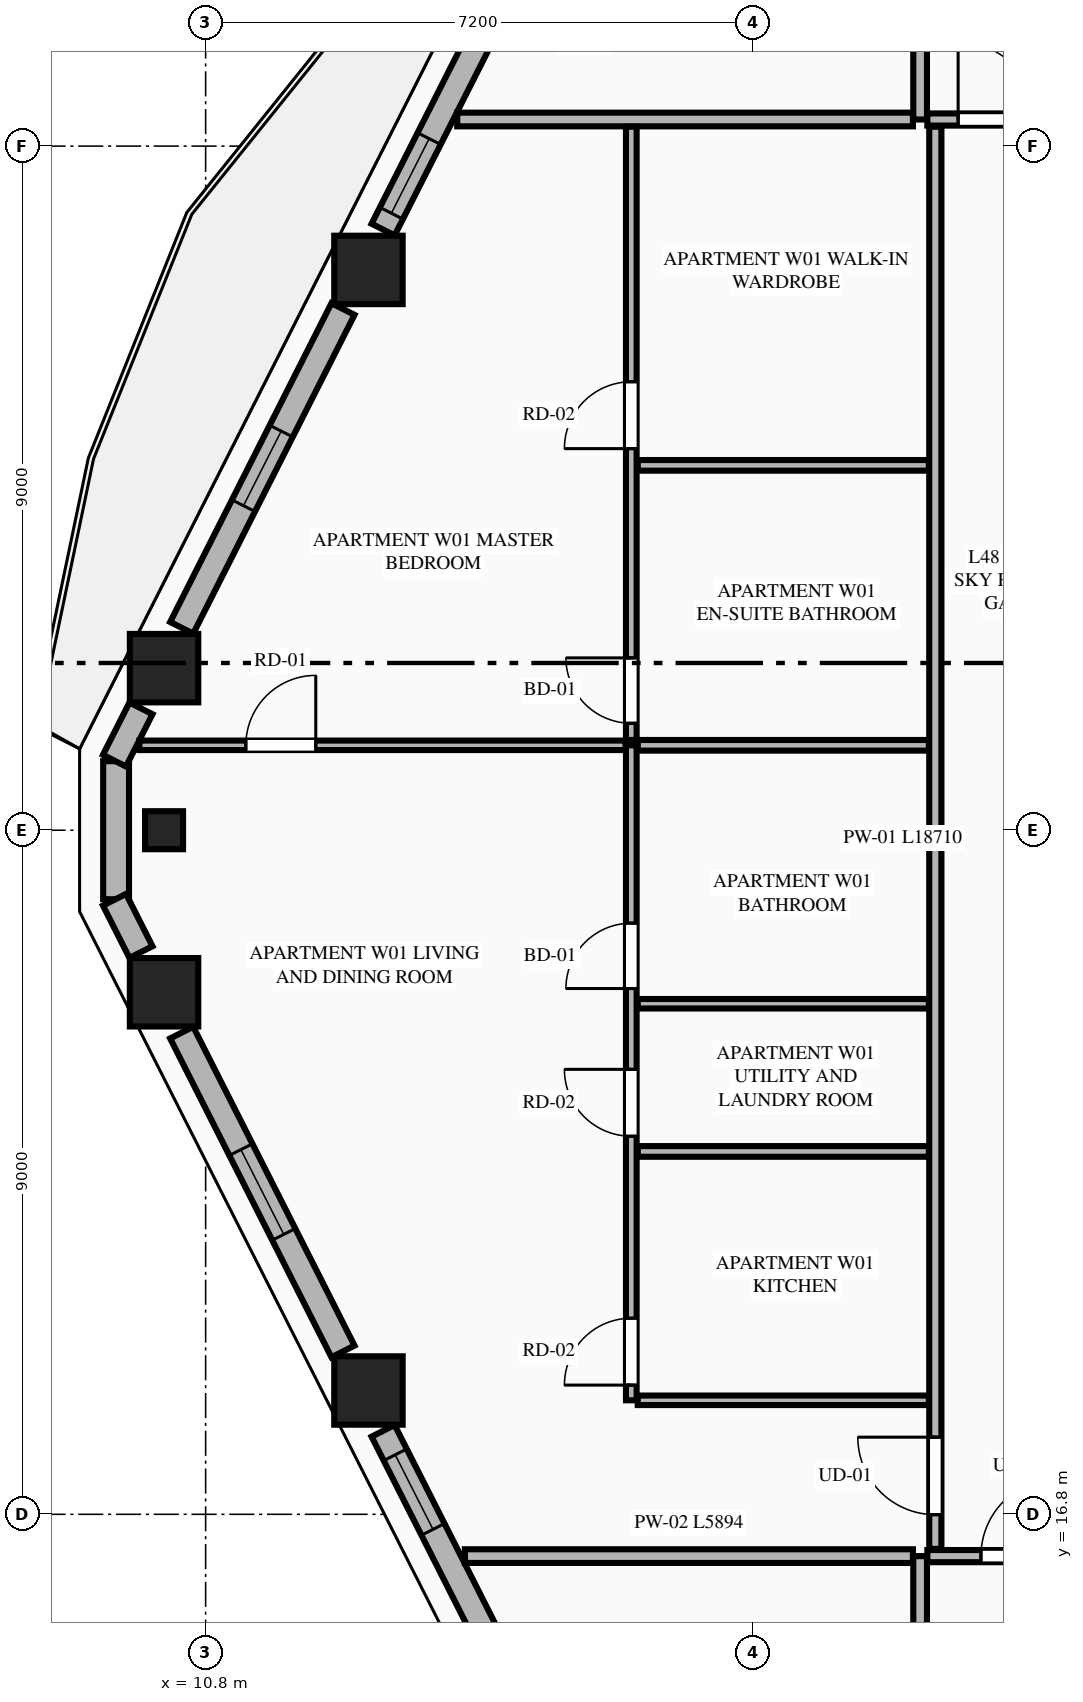
"""IFC4 building model, lengths in metres.
Left out: names, types, materials, properties, quantities, classifications, styles, units other than length and angle.
Written with IfcOpenShell. Run it as: python <this file> out.ifc"""

import sys

from ifc_helpers import new_model, si_unit, direction, frame, frame_2d, origin, origin_2d, place, context, subcontext, project, spatial, rectangle, extrude, element, fill, save


model = new_model("IFC4")
c1 = context("Model", 3, precision=1e-05, world=origin(), true_north=direction((0.0, 1.0)))
c2 = subcontext(c1, "Body", "Model", "MODEL_VIEW")
j1 = project(units=[si_unit("LENGTHUNIT", "METRE"), si_unit("PLANEANGLEUNIT", "RADIAN")], contexts=[c1])
p1 = place(None, origin())
s1 = spatial("IfcSite", under=j1, at=p1, CompositionType="ELEMENT")
p2 = place(p1, origin())
s2 = spatial("IfcBuilding", under=s1, at=p2, CompositionType="ELEMENT")
p3 = place(p2, frame((0.0, 0.0, 182.55)))
s3 = spatial("IfcBuildingStorey", under=s2, at=p3, CompositionType="ELEMENT", Elevation=182.55)
for number, where, z_axis, x_axis in (
    (1, (12.942, 33.171, 0.0), (0.0, 0.0, 1.0), (1.0, 0.0, 0.0)),
    (2, (10.253, 27.932, 0.0), (0.0, 0.0, 1.0), (1.0, 0.0, 0.0)),
    (3, (10.253, 23.668, 0.0), (0.0, 0.0, 1.0), (1.0, 0.0, 0.0)),
    (4, (12.942, 18.429, 0.0), (0.0, 0.0, 1.0), (1.0, 0.0, 0.0)),
):
    element("IfcColumn", number, at=place(p3, frame(where, z_axis=z_axis, x_axis=x_axis)), inside=s3, PredefinedType="COLUMN", context=c2, shape_type="SweptSolid", body=[
        extrude(rectangle(XDim=0.9, YDim=0.9, at=origin_2d()), origin(), (0.0, 0.0, 1.0), 3.55),
    ])
p4 = place(p3, frame((10.253, 25.8, 0.0), z_axis=(0.0, 0.0, 1.0), x_axis=(0.0, -1.0, 0.0)))
e5 = element("IfcColumn", 5, at=p4, inside=s3, PredefinedType="PILASTER", context=c2, shape_type="SweptSolid", body=[
    extrude(rectangle(XDim=0.5, YDim=0.35, at=origin_2d()), origin(), (0.0, 0.0, 1.0), 3.55),
])
p5 = place(p3, frame((9.622, 26.708, 0.0), z_axis=(0.0, 0.0, 1.0), x_axis=(0.0, -1.0, 0.0)))
e6 = element("IfcWall", 6, at=p5, inside=s3, PredefinedType="STANDARD", context=c2, shape_type="SweptSolid", body=[
    extrude(rectangle(XDim=1.816, YDim=0.34, at=frame_2d((0.908, 0.0))), origin(), (0.0, 0.0, 1.0), 3.35),
])
p6 = place(p3, frame((15.352, 38.083, 0.0), z_axis=(0.0, 0.0, 1.0), x_axis=(-0.451524246964, -0.89225884944, 0.0)))
e7 = element("IfcWall", 7, at=p6, inside=s3, PredefinedType="STANDARD", context=c2, shape_type="SweptSolid", body=[
    extrude(rectangle(XDim=4.91, YDim=0.34, at=frame_2d((2.455, 0.0))), origin(), (0.0, 0.0, 1.0), 2.883),
])
p7 = place(p6, frame((0.968, 0.0, 0.0)))
e8 = element("IfcOpeningElement", 8, at=p7, cuts=e7, PredefinedType="OPENING", context=c2, shape_type="SweptSolid", body=[
    extrude(rectangle(XDim=1.1, YDim=2.25, at=frame_2d((0.55, 1.125))), frame((0.0, 0.18, 0.0), z_axis=(0.0, -1.0, 0.0), x_axis=(1.0, 0.0, 0.0)), (0.0, 0.0, 1.0), 0.36),
])
p8 = place(p6, frame((3.569, 0.0, 0.75)))
e9 = element("IfcOpeningElement", 9, at=p8, cuts=e7, PredefinedType="OPENING", context=c2, shape_type="SweptSolid", body=[
    extrude(rectangle(XDim=1.1, YDim=1.983, at=frame_2d((0.55, 0.991))), frame((0.0, 0.18, 0.0), z_axis=(0.0, -1.0, 0.0), x_axis=(1.0, 0.0, 0.0)), (0.0, 0.0, 1.0), 0.36),
])
p9 = place(p3, frame((12.607, 32.657, 0.0), z_axis=(0.0, 0.0, 1.0), x_axis=(-0.451426298588, -0.892308409096, 0.0)))
e10 = element("IfcWall", 10, at=p9, inside=s3, PredefinedType="STANDARD", context=c2, shape_type="SweptSolid", body=[
    extrude(rectangle(XDim=4.7, YDim=0.34, at=frame_2d((2.35, 0.0))), origin(), (0.0, 0.0, 1.0), 2.883),
])
p10 = place(p9, frame((1.8, 0.0, 0.75)))
e11 = element("IfcOpeningElement", 11, at=p10, cuts=e10, PredefinedType="OPENING", context=c2, shape_type="SweptSolid", body=[
    extrude(rectangle(XDim=1.1, YDim=1.983, at=frame_2d((0.55, 0.991))), frame((0.0, 0.18, 0.0), z_axis=(0.0, -1.0, 0.0), x_axis=(1.0, 0.0, 0.0)), (0.0, 0.0, 1.0), 0.36),
])
for number, where, z_axis, x_axis in (
    (12, (9.949, 27.403, 0.0), (0.0, 0.0, 1.0), (-0.451, -0.892, 0.0)),
    (13, (9.601, 24.885, 0.0), (0.0, 0.0, 1.0), (0.451, -0.892, 0.0)),
):
    element("IfcWall", number, at=place(p3, frame(where, z_axis=z_axis, x_axis=x_axis)), inside=s3, PredefinedType="STANDARD", context=c2, shape_type="SweptSolid", body=[
        extrude(rectangle(XDim=0.771, YDim=0.34, at=frame_2d((0.385, 0.0))), origin(), (0.0, 0.0, 1.0), 3.35),
    ])
p11 = place(p3, frame((10.485, 23.137, 0.0), z_axis=(0.0, 0.0, 1.0), x_axis=(0.451447222193, -0.892297823361, 0.0)))
e14 = element("IfcWall", 14, at=p11, inside=s3, PredefinedType="STANDARD", context=c2, shape_type="SweptSolid", body=[
    extrude(rectangle(XDim=4.7, YDim=0.34, at=frame_2d((2.35, 0.0))), origin(), (0.0, 0.0, 1.0), 2.883),
])
p12 = place(p11, frame((1.725, 0.0, 0.75)))
e15 = element("IfcOpeningElement", 15, at=p12, cuts=e14, PredefinedType="OPENING", context=c2, shape_type="SweptSolid", body=[
    extrude(rectangle(XDim=1.25, YDim=1.95, at=frame_2d((0.625, 0.975))), frame((0.0, 0.18, 0.0), z_axis=(0.0, -1.0, 0.0), x_axis=(1.0, 0.0, 0.0)), (0.0, 0.0, 1.0), 0.36),
])
p13 = place(p3, frame((13.135, 17.898, 0.0), z_axis=(0.0, 0.0, 1.0), x_axis=(0.451544279509, -0.892248711763, 0.0)))
e16 = element("IfcWall", 16, at=p13, inside=s3, PredefinedType="STANDARD", context=c2, shape_type="SweptSolid", body=[
    extrude(rectangle(XDim=4.91, YDim=0.34, at=frame_2d((2.455, 0.0))), origin(), (0.0, 0.0, 1.0), 2.883),
])
p14 = place(p13, frame((0.353, 0.0, 0.75)))
e17 = element("IfcOpeningElement", 17, at=p14, cuts=e16, PredefinedType="OPENING", context=c2, shape_type="SweptSolid", body=[
    extrude(rectangle(XDim=1.1, YDim=1.983, at=frame_2d((0.55, 0.991))), frame((0.0, 0.18, 0.0), z_axis=(0.0, -1.0, 0.0), x_axis=(1.0, 0.0, 0.0)), (0.0, 0.0, 1.0), 0.36),
])
p15 = place(p13, frame((2.959, 0.0, 0.75)))
e18 = element("IfcOpeningElement", 18, at=p15, cuts=e16, PredefinedType="OPENING", context=c2, shape_type="SweptSolid", body=[
    extrude(rectangle(XDim=1.1, YDim=1.983, at=frame_2d((0.55, 0.991))), frame((0.0, 0.18, 0.0), z_axis=(0.0, -1.0, 0.0), x_axis=(1.0, 0.0, 0.0)), (0.0, 0.0, 1.0), 0.36),
])
p16 = place(p3, frame((20.2, 5.968, 0.0), z_axis=(0.0, 0.0, 1.0), x_axis=(0.0, 1.0, 0.0)))
e19 = element("IfcWall", 19, at=p16, inside=s3, PredefinedType="PARTITIONING", context=c2, shape_type="SweptSolid", body=[
    extrude(rectangle(XDim=10.282, YDim=0.18, at=frame_2d((5.141, 0.0))), origin(), (0.0, 0.0, 1.0), 3.35),
])
p17 = place(p3, frame((20.295, 16.25, 0.0), z_axis=(0.0, 0.0, 1.0), x_axis=(1.0, 0.0, 0.0)))
e20 = element("IfcWall", 20, at=p17, inside=s3, PredefinedType="PARTITIONING", context=c2, shape_type="SweptSolid", body=[
    extrude(rectangle(XDim=8.467, YDim=0.16, at=frame_2d((4.233, 0.0))), origin(), (0.0, 0.0, 1.0), 3.35),
])
p18 = place(p17, frame((0.705, 0.0, 0.0)))
e21 = element("IfcOpeningElement", 21, at=p18, cuts=e20, PredefinedType="OPENING", context=c2, shape_type="SweptSolid", body=[
    extrude(rectangle(XDim=1.02, YDim=2.25, at=frame_2d((0.51, 1.125))), frame((0.0, 0.09, 0.0), z_axis=(0.0, -1.0, 0.0), x_axis=(1.0, 0.0, 0.0)), (0.0, 0.0, 1.0), 0.18),
])
p19 = place(p3, frame((20.2, 35.15, 0.0), z_axis=(0.0, 0.0, 1.0), x_axis=(0.0, 1.0, 0.0)))
e22 = element("IfcWall", 22, at=p19, inside=s3, PredefinedType="PARTITIONING", context=c2, shape_type="SweptSolid", body=[
    extrude(rectangle(XDim=10.482, YDim=0.18, at=frame_2d((5.241, 0.0))), origin(), (0.0, 0.0, 1.0), 3.35),
])
p20 = place(p3, frame((20.295, 35.15, 0.0), z_axis=(0.0, 0.0, 1.0), x_axis=(1.0, 0.0, 0.0)))
e23 = element("IfcWall", 23, at=p20, inside=s3, PredefinedType="PARTITIONING", context=c2, shape_type="SweptSolid", body=[
    extrude(rectangle(XDim=15.553, YDim=0.16, at=frame_2d((7.776, 0.0))), origin(), (0.0, 0.0, 1.0), 3.35),
])
p21 = place(p20, frame((0.405, 0.0, 0.0)))
e24 = element("IfcOpeningElement", 24, at=p21, cuts=e23, PredefinedType="OPENING", context=c2, shape_type="SweptSolid", body=[
    extrude(rectangle(XDim=1.02, YDim=2.25, at=frame_2d((0.51, 1.125))), frame((0.0, 0.09, 0.0), z_axis=(0.0, -1.0, 0.0), x_axis=(1.0, 0.0, 0.0)), (0.0, 0.0, 1.0), 0.18),
])
p22 = place(p3, frame((14.211, 16.25, 0.0), z_axis=(0.0, 0.0, 1.0), x_axis=(1.0, 0.0, 0.0)))
e25 = element("IfcWall", 25, at=p22, inside=s3, PredefinedType="PARTITIONING", context=c2, shape_type="SweptSolid", body=[
    extrude(rectangle(XDim=5.894, YDim=0.18, at=frame_2d((2.947, 0.0))), origin(), (0.0, 0.0, 1.0), 3.35),
])
p23 = place(p3, frame((14.11, 35.15, 0.0), z_axis=(0.0, 0.0, 1.0), x_axis=(1.0, 0.0, 0.0)))
e26 = element("IfcWall", 26, at=p23, inside=s3, PredefinedType="PARTITIONING", context=c2, shape_type="SweptSolid", body=[
    extrude(rectangle(XDim=5.995, YDim=0.18, at=frame_2d((2.998, 0.0))), origin(), (0.0, 0.0, 1.0), 3.35),
])
p24 = place(p3, frame((20.4, 16.345, 0.0), z_axis=(0.0, 0.0, 1.0), x_axis=(0.0, 1.0, 0.0)))
e27 = element("IfcWall", 27, at=p24, inside=s3, PredefinedType="PARTITIONING", context=c2, shape_type="SweptSolid", body=[
    extrude(rectangle(XDim=18.71, YDim=0.16, at=frame_2d((9.355, 0.0))), origin(), (0.0, 0.0, 1.0), 3.35),
])
p25 = place(p24, frame((0.45, 0.0, 0.0)))
e28 = element("IfcOpeningElement", 28, at=p25, cuts=e27, PredefinedType="OPENING", context=c2, shape_type="SweptSolid", body=[
    extrude(rectangle(XDim=1.02, YDim=2.25, at=frame_2d((0.51, 1.125))), frame((0.0, 0.09, 0.0), z_axis=(0.0, -1.0, 0.0), x_axis=(1.0, 0.0, 0.0)), (0.0, 0.0, 1.0), 0.18),
])
p26 = place(p3, frame((16.485, 18.3, 0.0), z_axis=(0.0, 0.0, 1.0), x_axis=(1.0, 0.0, 0.0)))
e29 = element("IfcWall", 29, at=p26, inside=s3, PredefinedType="PARTITIONING", context=c2, shape_type="SweptSolid", body=[
    extrude(rectangle(XDim=3.83, YDim=0.125, at=frame_2d((1.915, 0.0))), origin(), (0.0, 0.0, 1.0), 2.807),
])
p27 = place(p3, frame((16.4, 18.3, 0.0), z_axis=(0.0, 0.0, 1.0), x_axis=(0.0, 1.0, 0.0)))
e30 = element("IfcWall", 30, at=p27, inside=s3, PredefinedType="PLUMBINGWALL", context=c2, shape_type="SweptSolid", body=[
    extrude(rectangle(XDim=8.617, YDim=0.14, at=frame_2d((4.309, 0.0))), origin(), (0.0, 0.0, 1.0), 3.35),
])
p28 = place(p27, frame((0.2, 0.0, 0.0)))
e31 = element("IfcOpeningElement", 31, at=p28, cuts=e30, PredefinedType="OPENING", context=c2, shape_type="SweptSolid", body=[
    extrude(rectangle(XDim=0.88, YDim=2.15, at=frame_2d((0.44, 1.075))), frame((0.0, 0.08, 0.0), z_axis=(0.0, -1.0, 0.0), x_axis=(1.0, 0.0, 0.0)), (0.0, 0.0, 1.0), 0.16),
])
p29 = place(p27, frame((3.474, 0.0, 0.0)))
e32 = element("IfcOpeningElement", 32, at=p29, cuts=e30, PredefinedType="OPENING", context=c2, shape_type="SweptSolid", body=[
    extrude(rectangle(XDim=0.88, YDim=2.15, at=frame_2d((0.44, 1.075))), frame((0.0, 0.08, 0.0), z_axis=(0.0, -1.0, 0.0), x_axis=(1.0, 0.0, 0.0)), (0.0, 0.0, 1.0), 0.16),
])
p30 = place(p27, frame((5.417, 0.0, 0.0)))
e33 = element("IfcOpeningElement", 33, at=p30, cuts=e30, PredefinedType="OPENING", context=c2, shape_type="SweptSolid", body=[
    extrude(rectangle(XDim=0.86, YDim=2.1, at=frame_2d((0.43, 1.05))), frame((0.0, 0.08, 0.0), z_axis=(0.0, -1.0, 0.0), x_axis=(1.0, 0.0, 0.0)), (0.0, 0.0, 1.0), 0.16),
])
p31 = place(p3, frame((16.4, 26.987, 0.0), z_axis=(0.0, 0.0, 1.0), x_axis=(0.0, 1.0, 0.0)))
e34 = element("IfcWall", 34, at=p31, inside=s3, PredefinedType="PLUMBINGWALL", context=c2, shape_type="SweptSolid", body=[
    extrude(rectangle(XDim=8.068, YDim=0.14, at=frame_2d((4.034, 0.0))), origin(), (0.0, 0.0, 1.0), 3.35),
])
p32 = place(p31, frame((0.22, 0.0, 0.0)))
e35 = element("IfcOpeningElement", 35, at=p32, cuts=e34, PredefinedType="OPENING", context=c2, shape_type="SweptSolid", body=[
    extrude(rectangle(XDim=0.86, YDim=2.1, at=frame_2d((0.43, 1.05))), frame((0.0, 0.08, 0.0), z_axis=(0.0, -1.0, 0.0), x_axis=(1.0, 0.0, 0.0)), (0.0, 0.0, 1.0), 0.16),
])
p33 = place(p31, frame((3.833, 0.0, 0.0)))
e36 = element("IfcOpeningElement", 36, at=p33, cuts=e34, PredefinedType="OPENING", context=c2, shape_type="SweptSolid", body=[
    extrude(rectangle(XDim=0.88, YDim=2.15, at=frame_2d((0.44, 1.075))), frame((0.0, 0.08, 0.0), z_axis=(0.0, -1.0, 0.0), x_axis=(1.0, 0.0, 0.0)), (0.0, 0.0, 1.0), 0.16),
])
p34 = place(p3, frame((16.485, 26.917, 0.0), z_axis=(0.0, 0.0, 1.0), x_axis=(1.0, 0.0, 0.0)))
e37 = element("IfcWall", 37, at=p34, inside=s3, PredefinedType="PLUMBINGWALL", context=c2, shape_type="SweptSolid", body=[
    extrude(rectangle(XDim=3.83, YDim=0.14, at=frame_2d((1.915, 0.0))), origin(), (0.0, 0.0, 1.0), 3.35),
])
p35 = place(p3, frame((9.929, 26.917, 0.0), z_axis=(0.0, 0.0, 1.0), x_axis=(1.0, 0.0, 0.0)))
e38 = element("IfcWall", 38, at=p35, inside=s3, PredefinedType="PARTITIONING", context=c2, shape_type="SweptSolid", body=[
    extrude(rectangle(XDim=6.396, YDim=0.125, at=frame_2d((3.198, 0.0))), origin(), (0.0, 0.0, 1.0), 3.35),
])
p36 = place(p35, frame((1.4, 0.0, 0.0)))
e39 = element("IfcOpeningElement", 39, at=p36, cuts=e38, PredefinedType="OPENING", context=c2, shape_type="SweptSolid", body=[
    extrude(rectangle(XDim=0.92, YDim=2.15, at=frame_2d((0.46, 1.075))), frame((0.0, 0.073, 0.0), z_axis=(0.0, -1.0, 0.0), x_axis=(1.0, 0.0, 0.0)), (0.0, 0.0, 1.0), 0.145),
])
p37 = place(p3, frame((16.485, 21.574, 0.0), z_axis=(0.0, 0.0, 1.0), x_axis=(1.0, 0.0, 0.0)))
e40 = element("IfcWall", 40, at=p37, inside=s3, PredefinedType="PLUMBINGWALL", context=c2, shape_type="SweptSolid", body=[
    extrude(rectangle(XDim=3.83, YDim=0.14, at=frame_2d((1.915, 0.0))), origin(), (0.0, 0.0, 1.0), 3.35),
])
p38 = place(p3, frame((16.485, 23.517, 0.0), z_axis=(0.0, 0.0, 1.0), x_axis=(1.0, 0.0, 0.0)))
e41 = element("IfcWall", 41, at=p38, inside=s3, PredefinedType="PARTITIONING", context=c2, shape_type="SweptSolid", body=[
    extrude(rectangle(XDim=3.83, YDim=0.125, at=frame_2d((1.915, 0.0))), origin(), (0.0, 0.0, 1.0), 3.35),
])
p39 = place(p3, frame((16.485, 30.6, 0.0), z_axis=(0.0, 0.0, 1.0), x_axis=(1.0, 0.0, 0.0)))
e42 = element("IfcWall", 42, at=p39, inside=s3, PredefinedType="PLUMBINGWALL", context=c2, shape_type="SweptSolid", body=[
    extrude(rectangle(XDim=3.83, YDim=0.14, at=frame_2d((1.915, 0.0))), origin(), (0.0, 0.0, 1.0), 3.35),
])
p40 = place(p10, origin())
e43 = element("IfcWindow", 43, at=p40, inside=s3, PartitioningType="SINGLE_PANEL", PredefinedType="WINDOW", context=c2, shape_type="SweptSolid", body=[
    extrude(rectangle(XDim=1.1, YDim=1.983, at=frame_2d((0.55, 0.991))), frame((0.0, 0.03, 0.0), z_axis=(0.0, -1.0, 0.0), x_axis=(1.0, 0.0, 0.0)), (0.0, 0.0, 1.0), 0.06),
])
fill(e11, e43)
p41 = place(p12, origin())
e44 = element("IfcWindow", 44, at=p41, inside=s3, PartitioningType="SINGLE_PANEL", PredefinedType="WINDOW", context=c2, shape_type="SweptSolid", body=[
    extrude(rectangle(XDim=1.25, YDim=1.95, at=frame_2d((0.625, 0.975))), frame((0.0, 0.03, 0.0), z_axis=(0.0, -1.0, 0.0), x_axis=(1.0, 0.0, 0.0)), (0.0, 0.0, 1.0), 0.06),
])
fill(e15, e44)
p42 = place(p14, origin())
e45 = element("IfcWindow", 45, at=p42, inside=s3, PartitioningType="SINGLE_PANEL", PredefinedType="WINDOW", context=c2, shape_type="SweptSolid", body=[
    extrude(rectangle(XDim=1.1, YDim=1.983, at=frame_2d((0.55, 0.991))), frame((0.0, 0.03, 0.0), z_axis=(0.0, -1.0, 0.0), x_axis=(1.0, 0.0, 0.0)), (0.0, 0.0, 1.0), 0.06),
])
fill(e17, e45)
p43 = place(p18, origin())
e46 = element("IfcDoor", 46, at=p43, inside=s3, OperationType="SINGLE_SWING_RIGHT", PredefinedType="DOOR", context=c2, shape_type="SweptSolid", body=[
    extrude(rectangle(XDim=1.02, YDim=2.25, at=frame_2d((0.51, 1.125))), frame((0.0, 0.025, 0.0), z_axis=(0.0, -1.0, 0.0), x_axis=(1.0, 0.0, 0.0)), (0.0, 0.0, 1.0), 0.05),
])
fill(e21, e46)
p44 = place(p21, origin())
e47 = element("IfcDoor", 47, at=p44, inside=s3, OperationType="SINGLE_SWING_LEFT", PredefinedType="DOOR", context=c2, shape_type="SweptSolid", body=[
    extrude(rectangle(XDim=1.02, YDim=2.25, at=frame_2d((0.51, 1.125))), frame((0.0, 0.025, 0.0), z_axis=(0.0, -1.0, 0.0), x_axis=(1.0, 0.0, 0.0)), (0.0, 0.0, 1.0), 0.05),
])
fill(e24, e47)
p45 = place(p28, origin())
e48 = element("IfcDoor", 48, at=p45, inside=s3, OperationType="SINGLE_SWING_LEFT", PredefinedType="DOOR", context=c2, shape_type="SweptSolid", body=[
    extrude(rectangle(XDim=0.88, YDim=2.15, at=frame_2d((0.44, 1.075))), frame((0.0, 0.025, 0.0), z_axis=(0.0, -1.0, 0.0), x_axis=(1.0, 0.0, 0.0)), (0.0, 0.0, 1.0), 0.05),
])
fill(e31, e48)
p46 = place(p29, origin())
e49 = element("IfcDoor", 49, at=p46, inside=s3, OperationType="SINGLE_SWING_RIGHT", PredefinedType="DOOR", context=c2, shape_type="SweptSolid", body=[
    extrude(rectangle(XDim=0.88, YDim=2.15, at=frame_2d((0.44, 1.075))), frame((0.0, 0.025, 0.0), z_axis=(0.0, -1.0, 0.0), x_axis=(1.0, 0.0, 0.0)), (0.0, 0.0, 1.0), 0.05),
])
fill(e32, e49)
p47 = place(p30, origin())
e50 = element("IfcDoor", 50, at=p47, inside=s3, OperationType="SINGLE_SWING_LEFT", PredefinedType="DOOR", context=c2, shape_type="SweptSolid", body=[
    extrude(rectangle(XDim=0.86, YDim=2.1, at=frame_2d((0.43, 1.05))), frame((0.0, 0.025, 0.0), z_axis=(0.0, -1.0, 0.0), x_axis=(1.0, 0.0, 0.0)), (0.0, 0.0, 1.0), 0.05),
])
fill(e33, e50)
p48 = place(p32, origin())
e51 = element("IfcDoor", 51, at=p48, inside=s3, OperationType="SINGLE_SWING_RIGHT", PredefinedType="DOOR", context=c2, shape_type="SweptSolid", body=[
    extrude(rectangle(XDim=0.86, YDim=2.1, at=frame_2d((0.43, 1.05))), frame((0.0, 0.025, 0.0), z_axis=(0.0, -1.0, 0.0), x_axis=(1.0, 0.0, 0.0)), (0.0, 0.0, 1.0), 0.05),
])
fill(e35, e51)
p49 = place(p33, origin())
e52 = element("IfcDoor", 52, at=p49, inside=s3, OperationType="SINGLE_SWING_LEFT", PredefinedType="DOOR", context=c2, shape_type="SweptSolid", body=[
    extrude(rectangle(XDim=0.88, YDim=2.15, at=frame_2d((0.44, 1.075))), frame((0.0, 0.025, 0.0), z_axis=(0.0, -1.0, 0.0), x_axis=(1.0, 0.0, 0.0)), (0.0, 0.0, 1.0), 0.05),
])
fill(e36, e52)
p50 = place(p25, origin())
e53 = element("IfcDoor", 53, at=p50, inside=s3, OperationType="SINGLE_SWING_RIGHT", PredefinedType="DOOR", context=c2, shape_type="SweptSolid", body=[
    extrude(rectangle(XDim=1.02, YDim=2.25, at=frame_2d((0.51, 1.125))), frame((0.0, 0.025, 0.0), z_axis=(0.0, -1.0, 0.0), x_axis=(1.0, 0.0, 0.0)), (0.0, 0.0, 1.0), 0.05),
])
fill(e28, e53)
p51 = place(p36, origin())
e54 = element("IfcDoor", 54, at=p51, inside=s3, OperationType="SINGLE_SWING_RIGHT", PredefinedType="DOOR", context=c2, shape_type="SweptSolid", body=[
    extrude(rectangle(XDim=0.92, YDim=2.15, at=frame_2d((0.46, 1.075))), frame((0.0, 0.025, 0.0), z_axis=(0.0, -1.0, 0.0), x_axis=(1.0, 0.0, 0.0)), (0.0, 0.0, 1.0), 0.05),
])
fill(e39, e54)
p52 = place(p8, origin())
e55 = element("IfcWindow", 55, at=p52, inside=s3, PartitioningType="SINGLE_PANEL", PredefinedType="WINDOW", context=c2, shape_type="SweptSolid", body=[
    extrude(rectangle(XDim=1.1, YDim=1.983, at=frame_2d((0.55, 0.991))), frame((0.0, 0.03, 0.0), z_axis=(0.0, -1.0, 0.0), x_axis=(1.0, 0.0, 0.0)), (0.0, 0.0, 1.0), 0.06),
])
fill(e9, e55)
save(model, sys.argv[1])
